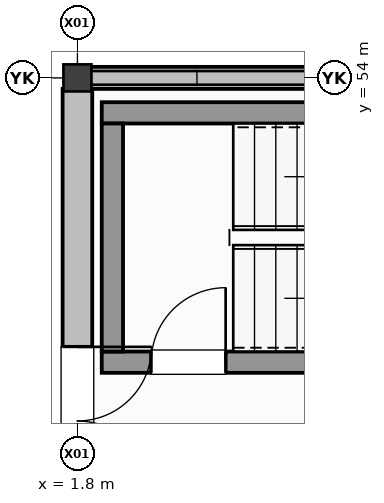
"""IFC4 building model, lengths in metres.
Left out: names, types, materials, properties, quantities, classifications, styles, units other than length and angle.
Written with IfcOpenShell. Run it as: python <this file> out.ifc"""

import sys

from ifc_helpers import new_model, si_unit, direction, frame, frame_2d, origin, origin_2d, place, context, subcontext, project, spatial, rectangle, i_section, extrude, element, fill, save


model = new_model("IFC4")
c1 = context("Model", 3, precision=1e-05, world=origin(), true_north=direction((0.0, 1.0)))
c2 = subcontext(c1, "Body", "Model", "MODEL_VIEW")
j1 = project(units=[si_unit("LENGTHUNIT", "METRE"), si_unit("PLANEANGLEUNIT", "RADIAN")], contexts=[c1])
p1 = place(None, origin())
s1 = spatial("IfcSite", under=j1, at=p1, CompositionType="ELEMENT")
p2 = place(p1, origin())
s2 = spatial("IfcBuilding", under=s1, at=p2, CompositionType="ELEMENT")
p3 = place(p2, origin())
s3 = spatial("IfcBuildingStorey", under=s2, at=p3, CompositionType="ELEMENT", Elevation=0.0)
p4 = place(p3, frame((1.8, 54.0, -0.41), z_axis=(0.0, 0.0, 1.0), x_axis=(1.0, 0.0, 0.0)))
e1 = element("IfcColumn", 1, at=p4, inside=s3, PredefinedType="COLUMN", context=c2, shape_type="SweptSolid", body=[
    extrude(i_section(OverallWidth=0.369, OverallDepth=0.356, WebThickness=0.011, FlangeThickness=0.018, at=origin_2d()), origin(), (0.0, 0.0, 1.0), 6.41),
])
p5 = place(p3, frame((7.655, 54.0, 0.0), z_axis=(0.0, 0.0, 1.0), x_axis=(-1.0, 0.0, 0.0)))
e2 = element("IfcWall", 2, at=p5, inside=s3, PredefinedType="STANDARD", context=c2, shape_type="SweptSolid", body=[
    extrude(rectangle(XDim=5.71, YDim=0.29, at=frame_2d((2.855, 0.0))), origin(), (0.0, 0.0, 1.0), 0.92),
])
p6 = place(p3, frame((1.8, 53.855, 0.0), z_axis=(0.0, 0.0, 1.0), x_axis=(0.0, -1.0, 0.0)))
e3 = element("IfcWall", 3, at=p6, inside=s3, PredefinedType="STANDARD", context=c2, shape_type="SweptSolid", body=[
    extrude(rectangle(XDim=5.71, YDim=0.39, at=frame_2d((2.855, 0.0))), origin(), (0.0, 0.0, 1.0), 5.044),
])
p7 = place(p6, frame((3.394, 0.0, 0.0)))
e4 = element("IfcOpeningElement", 4, at=p7, cuts=e3, PredefinedType="OPENING", context=c2, shape_type="SweptSolid", body=[
    extrude(rectangle(XDim=1.95, YDim=2.35, at=frame_2d((0.975, 1.175))), frame((0.0, 0.205, 0.0), z_axis=(0.0, -1.0, 0.0), x_axis=(1.0, 0.0, 0.0)), (0.0, 0.0, 1.0), 0.41),
])
p8 = place(p3, frame((2.12, 50.26, 0.0), z_axis=(0.0, 0.0, 1.0), x_axis=(1.0, 0.0, 0.0)))
e5 = element("IfcWall", 5, at=p8, inside=s3, PredefinedType="SHEAR", context=c2, shape_type="SweptSolid", body=[
    extrude(rectangle(XDim=8.16, YDim=0.28, at=frame_2d((4.08, 0.0))), origin(), (0.0, 0.0, 1.0), 6.0),
])
p9 = place(p8, frame((0.65, 0.0, 0.0)))
e6 = element("IfcOpeningElement", 6, at=p9, cuts=e5, PredefinedType="OPENING", context=c2, shape_type="SweptSolid", body=[
    extrude(rectangle(XDim=0.98, YDim=2.15, at=frame_2d((0.49, 1.075))), frame((0.0, 0.15, 0.0), z_axis=(0.0, -1.0, 0.0), x_axis=(1.0, 0.0, 0.0)), (0.0, 0.0, 1.0), 0.3),
])
p10 = place(p3, frame((10.28, 53.54, 0.0), z_axis=(0.0, 0.0, 1.0), x_axis=(-1.0, 0.0, 0.0)))
e7 = element("IfcWall", 7, at=p10, inside=s3, PredefinedType="SHEAR", context=c2, shape_type="SweptSolid", body=[
    extrude(rectangle(XDim=8.16, YDim=0.28, at=frame_2d((4.08, 0.0))), origin(), (0.0, 0.0, 1.0), 6.0),
])
p11 = place(p3, frame((2.26, 53.4, 0.0), z_axis=(0.0, 0.0, 1.0), x_axis=(0.0, -1.0, 0.0)))
e8 = element("IfcWall", 8, at=p11, inside=s3, PredefinedType="SHEAR", context=c2, shape_type="SweptSolid", body=[
    extrude(rectangle(XDim=3.0, YDim=0.28, at=frame_2d((1.5, 0.0))), origin(), (0.0, 0.0, 1.0), 6.0),
])
p12 = place(p7, frame((1.95, 0.0, 0.0), z_axis=(0.0, 0.0, 1.0), x_axis=(-1.0, 0.0, 0.0)))
e9 = element("IfcDoor", 9, at=p12, inside=s3, OperationType="DOUBLE_DOOR_SINGLE_SWING", PredefinedType="DOOR", context=c2, shape_type="SweptSolid", body=[
    extrude(rectangle(XDim=1.95, YDim=2.35, at=frame_2d((0.975, 1.175))), frame((0.0, 0.025, 0.0), z_axis=(0.0, -1.0, 0.0), x_axis=(1.0, 0.0, 0.0)), (0.0, 0.0, 1.0), 0.05),
])
fill(e4, e9)
p13 = place(p9, origin())
e10 = element("IfcDoor", 10, at=p13, inside=s3, OperationType="SINGLE_SWING_RIGHT", PredefinedType="DOOR", context=c2, shape_type="SweptSolid", body=[
    extrude(rectangle(XDim=0.98, YDim=2.15, at=frame_2d((0.49, 1.075))), frame((0.0, 0.025, 0.0), z_axis=(0.0, -1.0, 0.0), x_axis=(1.0, 0.0, 0.0)), (0.0, 0.0, 1.0), 0.05),
])
fill(e6, e10)
save(model, sys.argv[1])
